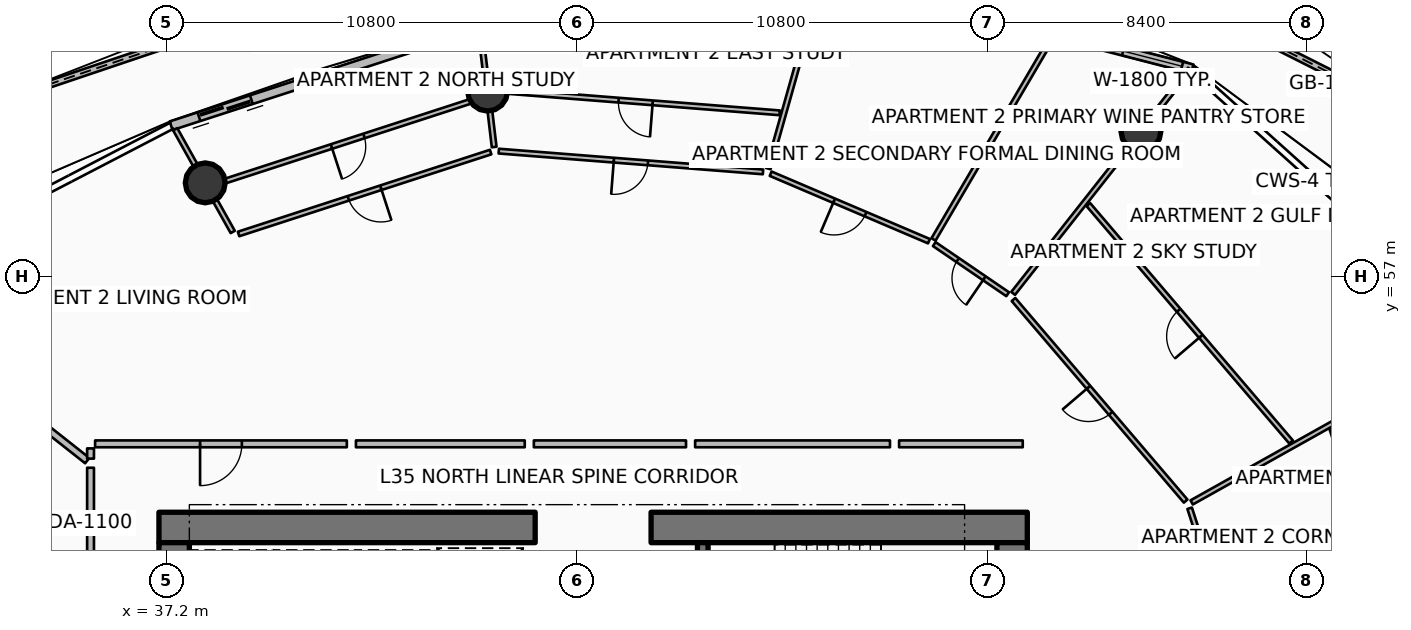
"""IFC4 building model, lengths in metres.
Left out: names, types, materials, properties, quantities, classifications, styles, units other than length and angle.
Written with IfcOpenShell. Run it as: python <this file> out.ifc"""

import sys

from ifc_helpers import new_model, si_unit, direction, frame, frame_2d, origin, origin_2d, place, context, subcontext, project, spatial, polyline, rectangle, circle, outline, extrude, element, fill, save


model = new_model("IFC4")
c1 = context("Model", 3, precision=1e-05, world=origin(), true_north=direction((0.0, 1.0)))
c2 = subcontext(c1, "Body", "Model", "MODEL_VIEW")
j1 = project(units=[si_unit("LENGTHUNIT", "METRE"), si_unit("PLANEANGLEUNIT", "RADIAN")], contexts=[c1])
p1 = place(None, origin())
s1 = spatial("IfcSite", under=j1, at=p1, CompositionType="ELEMENT")
p2 = place(p1, origin())
s2 = spatial("IfcBuilding", under=s1, at=p2, CompositionType="ELEMENT")
p3 = place(p2, frame((0.0, 0.0, 142.8)))
s3 = spatial("IfcBuildingStorey", under=s2, at=p3, CompositionType="ELEMENT", Elevation=142.8)
p4 = place(p3, frame((37.0, 50.4, 0.0), z_axis=(0.0, 0.0, 1.0), x_axis=(1.0, 0.0, 0.0)))
e1 = element("IfcWall", 1, at=p4, inside=s3, PredefinedType="SHEAR", context=c2, shape_type="SweptSolid", body=[
    extrude(rectangle(XDim=9.9, YDim=0.8, at=frame_2d((4.95, 0.0))), origin(), (0.0, 0.0, 1.0), 3.75),
])
p5 = place(p3, frame((49.95, 50.4, 0.0), z_axis=(0.0, 0.0, 1.0), x_axis=(1.0, 0.0, 0.0)))
e2 = element("IfcWall", 2, at=p5, inside=s3, PredefinedType="SHEAR", context=c2, shape_type="SweptSolid", body=[
    extrude(rectangle(XDim=9.9, YDim=0.8, at=frame_2d((4.95, 0.0))), origin(), (0.0, 0.0, 1.0), 3.75),
])
for number, where, z_axis, x_axis in (
    (3, (37.4, 34.0, 0.0), (0.0, 0.0, 1.0), (0.0, 1.0, 0.0)),
    (4, (59.45, 34.0, 0.0), (0.0, 0.0, 1.0), (0.0, 1.0, 0.0)),
):
    element("IfcWall", number, at=place(p3, frame(where, z_axis=z_axis, x_axis=x_axis)), inside=s3, PredefinedType="SHEAR", context=c2, shape_type="SweptSolid", body=[
        extrude(rectangle(XDim=16.0, YDim=0.8, at=frame_2d((8.0, 0.0))), origin(), (0.0, 0.0, 1.0), 3.75),
    ])
p6 = place(p3, frame((51.31, 46.5, 0.0), z_axis=(0.0, 0.0, 1.0), x_axis=(0.0, 1.0, 0.0)))
e5 = element("IfcWall", 5, at=p6, inside=s3, PredefinedType="SHEAR", context=c2, shape_type="SweptSolid", body=[
    extrude(rectangle(XDim=3.5, YDim=0.28, at=frame_2d((1.75, 0.0))), origin(), (0.0, 0.0, 1.0), 3.75),
])
for number, where, z_axis, x_axis in (
    (6, (62.84, 60.824, 0.0), (0.0, 0.0, 1.0), (1.0, 0.0, 0.0)),
    (7, (53.957, 63.122, 0.0), (0.0, 0.0, 1.0), (1.0, 0.0, 0.0)),
    (8, (45.647, 61.881, 0.0), (0.0, 0.0, 1.0), (1.0, 0.0, 0.0)),
    (9, (38.218, 59.467, 0.0), (0.0, 0.0, 1.0), (1.0, 0.0, 0.0)),
):
    element("IfcColumn", number, at=place(p3, frame(where, z_axis=z_axis, x_axis=x_axis)), inside=s3, PredefinedType="COLUMN", context=c2, shape_type="SweptSolid", body=[
        extrude(circle(Radius=0.525, at=origin_2d()), origin(), (0.0, 0.0, 1.0), 3.5),
    ])
p7 = place(p3, frame((70.17, 61.17, 0.0), z_axis=(0.0, 0.0, 1.0), x_axis=(-0.892736735019, 0.450578652344, 0.0)))
e10 = element("IfcWall", 10, at=p7, inside=s3, PredefinedType="PARAPET", context=c2, shape_type="SweptSolid", body=[
    extrude(outline(polyline([(0.0, 0.0), (10.93, 0.0), (10.93, 1.348), (5.465, 1.562), (0.0, 1.747), (0.0, 0.0)])), frame((0.0, 0.09, 0.0), z_axis=(0.0, -1.0, 0.0), x_axis=(1.0, 0.0, 0.0)), (0.0, 0.0, 1.0), 0.18),
])
p8 = place(p3, frame((40.64, 64.263, 0.0), z_axis=(0.0, 0.0, 1.0), x_axis=(-0.947571676397, -0.319543296113, 0.0)))
e11 = element("IfcWall", 11, at=p8, inside=s3, PredefinedType="PARAPET", context=c2, shape_type="SweptSolid", body=[
    extrude(outline(polyline([(0.0, 0.0), (9.383, 0.0), (9.383, 1.747), (4.691, 1.562), (0.0, 1.348), (0.0, 0.0)])), frame((0.0, 0.09, 0.0), z_axis=(0.0, -1.0, 0.0), x_axis=(1.0, 0.0, 0.0)), (0.0, 0.0, 1.0), 0.18),
])
p9 = place(p3, frame((64.192, 62.466, 0.0), z_axis=(0.0, 0.0, 1.0), x_axis=(-0.968379685126, 0.249481032214, 0.0)))
e12 = element("IfcWall", 12, at=p9, inside=s3, PredefinedType="SOLIDWALL", context=c2, shape_type="SweptSolid", body=[
    extrude(rectangle(XDim=10.082, YDim=0.24, at=frame_2d((5.041, 0.0))), origin(), (0.0, 0.0, 1.0), 2.45),
])
p10 = place(p9, frame((7.862, 0.0, 0.0)))
e13 = element("IfcOpeningElement", 13, at=p10, cuts=e12, PredefinedType="OPENING", context=c2, shape_type="SweptSolid", body=[
    extrude(rectangle(XDim=1.45, YDim=2.15, at=frame_2d((0.725, 1.075))), frame((0.0, 0.13, 0.0), z_axis=(0.0, -1.0, 0.0), x_axis=(1.0, 0.0, 0.0)), (0.0, 0.0, 1.0), 0.26),
])
p11 = place(p9, frame((0.28, 0.0, 0.65)))
e14 = element("IfcOpeningElement", 14, at=p11, cuts=e12, PredefinedType="OPENING", context=c2, shape_type="SweptSolid", body=[
    extrude(rectangle(XDim=1.6, YDim=1.5, at=frame_2d((0.8, 0.75))), frame((0.0, 0.13, 0.0), z_axis=(0.0, -1.0, 0.0), x_axis=(1.0, 0.0, 0.0)), (0.0, 0.0, 1.0), 0.26),
])
p12 = place(p3, frame((45.49, 63.624, 0.0), z_axis=(0.0, 0.0, 1.0), x_axis=(-0.951046390632, -0.309048156224, 0.0)))
e15 = element("IfcWall", 15, at=p12, inside=s3, PredefinedType="SOLIDWALL", context=c2, shape_type="SweptSolid", body=[
    extrude(rectangle(XDim=8.59, YDim=0.24, at=frame_2d((4.295, 0.0))), origin(), (0.0, 0.0, 1.0), 2.45),
])
p13 = place(p12, frame((6.37, 0.0, 0.0)))
e16 = element("IfcOpeningElement", 16, at=p13, cuts=e15, PredefinedType="OPENING", context=c2, shape_type="SweptSolid", body=[
    extrude(rectangle(XDim=1.45, YDim=2.15, at=frame_2d((0.725, 1.075))), frame((0.0, 0.13, 0.0), z_axis=(0.0, -1.0, 0.0), x_axis=(1.0, 0.0, 0.0)), (0.0, 0.0, 1.0), 0.26),
])
p14 = place(p12, frame((0.28, 0.0, 0.65)))
e17 = element("IfcOpeningElement", 17, at=p14, cuts=e15, PredefinedType="OPENING", context=c2, shape_type="SweptSolid", body=[
    extrude(rectangle(XDim=1.6, YDim=1.5, at=frame_2d((0.8, 0.75))), frame((0.0, 0.13, 0.0), z_axis=(0.0, -1.0, 0.0), x_axis=(1.0, 0.0, 0.0)), (0.0, 0.0, 1.0), 0.26),
])
p15 = place(p3, frame((35.114, 52.159, 0.0), z_axis=(0.0, 0.0, 1.0), x_axis=(-0.78531739611, 0.619093359169, 0.0)))
e18 = element("IfcWall", 18, at=p15, inside=s3, PredefinedType="PARTITIONING", context=c2, shape_type="SweptSolid", body=[
    extrude(rectangle(XDim=7.43, YDim=0.18, at=frame_2d((3.715, 0.0))), origin(), (0.0, 0.0, 1.0), 2.94),
])
p16 = place(p3, frame((35.2, 51.971, 0.0), z_axis=(0.0, 0.0, 1.0), x_axis=(0.0, -1.0, 0.0)))
e19 = element("IfcWall", 19, at=p16, inside=s3, PredefinedType="PARTITIONING", context=c2, shape_type="SweptSolid", body=[
    extrude(rectangle(XDim=6.241, YDim=0.18, at=frame_2d((3.12, 0.0))), origin(), (0.0, 0.0, 1.0), 2.94),
])
p17 = place(p16, frame((2.57, 0.0, 0.0)))
e20 = element("IfcOpeningElement", 20, at=p17, cuts=e19, PredefinedType="OPENING", context=c2, shape_type="SweptSolid", body=[
    extrude(rectangle(XDim=1.1, YDim=2.1, at=frame_2d((0.55, 1.05))), frame((0.0, 0.1, 0.0), z_axis=(0.0, -1.0, 0.0), x_axis=(1.0, 0.0, 0.0)), (0.0, 0.0, 1.0), 0.2),
])
p18 = place(p3, frame((41.944, 52.6, 0.0), z_axis=(0.0, 0.0, 1.0), x_axis=(-1.0, 0.0, 0.0)))
e21 = element("IfcWall", 21, at=p18, inside=s3, PredefinedType="PARTITIONING", context=c2, shape_type="SweptSolid", body=[
    extrude(rectangle(XDim=6.624, YDim=0.18, at=frame_2d((3.312, 0.0))), origin(), (0.0, 0.0, 1.0), 2.94),
])
p19 = place(p18, frame((2.762, 0.0, 0.0)))
e22 = element("IfcOpeningElement", 22, at=p19, cuts=e21, PredefinedType="OPENING", context=c2, shape_type="SweptSolid", body=[
    extrude(rectangle(XDim=1.1, YDim=2.1, at=frame_2d((0.55, 1.05))), frame((0.0, 0.1, 0.0), z_axis=(0.0, -1.0, 0.0), x_axis=(1.0, 0.0, 0.0)), (0.0, 0.0, 1.0), 0.2),
])
p20 = place(p3, frame((35.2, 52.48, 0.0), z_axis=(0.0, 0.0, 1.0), x_axis=(0.0, -1.0, 0.0)))
e23 = element("IfcWall", 23, at=p20, inside=s3, PredefinedType="PARTITIONING", context=c2, shape_type="SweptSolid", body=[
    extrude(rectangle(XDim=0.269, YDim=0.18, at=frame_2d((0.135, 0.0))), origin(), (0.0, 0.0, 1.0), 2.94),
])
p21 = place(p3, frame((66.277, 44.272, 0.0), z_axis=(0.0, 0.0, 1.0), x_axis=(-0.308993461661, 0.951064162215, 0.0)))
e24 = element("IfcWall", 24, at=p21, inside=s3, PredefinedType="PARTITIONING", context=c2, shape_type="SweptSolid", body=[
    extrude(rectangle(XDim=6.974, YDim=0.125, at=frame_2d((3.487, 0.0))), origin(), (0.0, 0.0, 1.0), 2.94),
])
p22 = place(p21, frame((3.037, 0.0, 0.0)))
e25 = element("IfcOpeningElement", 25, at=p22, cuts=e24, PredefinedType="OPENING", context=c2, shape_type="SweptSolid", body=[
    extrude(rectangle(XDim=0.9, YDim=2.08, at=frame_2d((0.45, 1.04))), frame((0.0, 0.073, 0.0), z_axis=(0.0, -1.0, 0.0), x_axis=(1.0, 0.0, 0.0)), (0.0, 0.0, 1.0), 0.145),
])
p23 = place(p3, frame((70.535, 44.776, 0.0), z_axis=(0.0, 0.0, 1.0), x_axis=(-0.309002443549, 0.951061244022, 0.0)))
e26 = element("IfcWall", 26, at=p23, inside=s3, PredefinedType="PARTITIONING", context=c2, shape_type="SweptSolid", body=[
    extrude(rectangle(XDim=8.647, YDim=0.125, at=frame_2d((4.324, 0.0))), origin(), (0.0, 0.0, 1.0), 2.94),
])
p24 = place(p23, frame((3.874, 0.0, 0.0)))
e27 = element("IfcOpeningElement", 27, at=p24, cuts=e26, PredefinedType="OPENING", context=c2, shape_type="SweptSolid", body=[
    extrude(rectangle(XDim=0.9, YDim=2.08, at=frame_2d((0.45, 1.04))), frame((0.0, 0.073, 0.0), z_axis=(0.0, -1.0, 0.0), x_axis=(1.0, 0.0, 0.0)), (0.0, 0.0, 1.0), 0.145),
])
p25 = place(p3, frame((59.73, 52.6, 0.0), z_axis=(0.0, 0.0, 1.0), x_axis=(-1.0, 0.0, 0.0)))
e28 = element("IfcWall", 28, at=p25, inside=s3, PredefinedType="PARTITIONING", context=c2, shape_type="SweptSolid", body=[
    extrude(rectangle(XDim=3.254, YDim=0.18, at=frame_2d((1.627, 0.0))), origin(), (0.0, 0.0, 1.0), 2.94),
])
p26 = place(p3, frame((64.175, 51.059, 0.0), z_axis=(0.0, 0.0, 1.0), x_axis=(0.872491881101, 0.488628608877, 0.0)))
e29 = element("IfcWall", 29, at=p26, inside=s3, PredefinedType="PARTITIONING", context=c2, shape_type="SweptSolid", body=[
    extrude(rectangle(XDim=8.247, YDim=0.125, at=frame_2d((4.124, 0.0))), origin(), (0.0, 0.0, 1.0), 2.94),
])
p27 = place(p3, frame((64.017, 51.093, 0.0), z_axis=(0.0, 0.0, 1.0), x_axis=(-0.649447060425, 0.76040680935, 0.0)))
e30 = element("IfcWall", 30, at=p27, inside=s3, PredefinedType="PARTITIONING", context=c2, shape_type="SweptSolid", body=[
    extrude(rectangle(XDim=6.975, YDim=0.125, at=frame_2d((3.487, 0.0))), origin(), (0.0, 0.0, 1.0), 2.94),
])
p28 = place(p27, frame((3.037, 0.0, 0.0)))
e31 = element("IfcOpeningElement", 31, at=p28, cuts=e30, PredefinedType="OPENING", context=c2, shape_type="SweptSolid", body=[
    extrude(rectangle(XDim=0.9, YDim=2.08, at=frame_2d((0.45, 1.04))), frame((0.0, 0.073, 0.0), z_axis=(0.0, -1.0, 0.0), x_axis=(1.0, 0.0, 0.0)), (0.0, 0.0, 1.0), 0.145),
])
p29 = place(p3, frame((66.792, 52.648, 0.0), z_axis=(0.0, 0.0, 1.0), x_axis=(-0.649446834215, 0.76040700255, 0.0)))
e32 = element("IfcWall", 32, at=p29, inside=s3, PredefinedType="PARTITIONING", context=c2, shape_type="SweptSolid", body=[
    extrude(rectangle(XDim=8.216, YDim=0.125, at=frame_2d((4.108, 0.0))), origin(), (0.0, 0.0, 1.0), 2.94),
])
p30 = place(p29, frame((3.658, 0.0, 0.0)))
e33 = element("IfcOpeningElement", 33, at=p30, cuts=e32, PredefinedType="OPENING", context=c2, shape_type="SweptSolid", body=[
    extrude(rectangle(XDim=0.9, YDim=2.08, at=frame_2d((0.45, 1.04))), frame((0.0, 0.073, 0.0), z_axis=(0.0, -1.0, 0.0), x_axis=(1.0, 0.0, 0.0)), (0.0, 0.0, 1.0), 0.145),
])
p31 = place(p3, frame((56.236, 52.6, 0.0), z_axis=(0.0, 0.0, 1.0), x_axis=(-1.0, 0.0, 0.0)))
e34 = element("IfcWall", 34, at=p31, inside=s3, PredefinedType="PARTITIONING", context=c2, shape_type="SweptSolid", body=[
    extrude(rectangle(XDim=5.127, YDim=0.18, at=frame_2d((2.563, 0.0))), origin(), (0.0, 0.0, 1.0), 2.94),
])
p32 = place(p3, frame((59.477, 56.559, 0.0), z_axis=(0.0, 0.0, 1.0), x_axis=(0.619110986016, 0.785303499925, 0.0)))
e35 = element("IfcWall", 35, at=p32, inside=s3, PredefinedType="PARTITIONING", context=c2, shape_type="SweptSolid", body=[
    extrude(rectangle(XDim=7.513, YDim=0.125, at=frame_2d((3.756, 0.0))), origin(), (0.0, 0.0, 1.0), 2.94),
])
p33 = place(p3, frame((57.382, 57.978, 0.0), z_axis=(0.0, 0.0, 1.0), x_axis=(0.506339561396, 0.862334186128, 0.0)))
e36 = element("IfcWall", 36, at=p33, inside=s3, PredefinedType="PARTITIONING", context=c2, shape_type="SweptSolid", body=[
    extrude(rectangle(XDim=6.163, YDim=0.125, at=frame_2d((3.081, 0.0))), origin(), (0.0, 0.0, 1.0), 2.94),
])
p34 = place(p3, frame((59.333, 56.537, 0.0), z_axis=(0.0, 0.0, 1.0), x_axis=(-0.825780816813, 0.563991172434, 0.0)))
e37 = element("IfcWall", 37, at=p34, inside=s3, PredefinedType="PARTITIONING", context=c2, shape_type="SweptSolid", body=[
    extrude(rectangle(XDim=2.338, YDim=0.125, at=frame_2d((1.169, 0.0))), origin(), (0.0, 0.0, 1.0), 2.94),
])
p35 = place(p34, frame((0.744, 0.0, 0.0)))
e38 = element("IfcOpeningElement", 38, at=p35, cuts=e37, PredefinedType="OPENING", context=c2, shape_type="SweptSolid", body=[
    extrude(rectangle(XDim=0.85, YDim=2.06, at=frame_2d((0.425, 1.03))), frame((0.0, 0.073, 0.0), z_axis=(0.0, -1.0, 0.0), x_axis=(1.0, 0.0, 0.0)), (0.0, 0.0, 1.0), 0.145),
])
p36 = place(p3, frame((57.263, 57.932, 0.0), z_axis=(0.0, 0.0, 1.0), x_axis=(-0.919910192906, 0.392129107549, 0.0)))
e39 = element("IfcWall", 39, at=p36, inside=s3, PredefinedType="PARTITIONING", context=c2, shape_type="SweptSolid", body=[
    extrude(rectangle(XDim=4.528, YDim=0.125, at=frame_2d((2.264, 0.0))), origin(), (0.0, 0.0, 1.0), 2.94),
])
p37 = place(p36, frame((1.814, 0.0, 0.0)))
e40 = element("IfcOpeningElement", 40, at=p37, cuts=e39, PredefinedType="OPENING", context=c2, shape_type="SweptSolid", body=[
    extrude(rectangle(XDim=0.9, YDim=2.08, at=frame_2d((0.45, 1.04))), frame((0.0, 0.073, 0.0), z_axis=(0.0, -1.0, 0.0), x_axis=(1.0, 0.0, 0.0)), (0.0, 0.0, 1.0), 0.145),
])
p38 = place(p3, frame((50.869, 52.6, 0.0), z_axis=(0.0, 0.0, 1.0), x_axis=(-1.0, 0.0, 0.0)))
e41 = element("IfcWall", 41, at=p38, inside=s3, PredefinedType="PARTITIONING", context=c2, shape_type="SweptSolid", body=[
    extrude(rectangle(XDim=4.004, YDim=0.18, at=frame_2d((2.002, 0.0))), origin(), (0.0, 0.0, 1.0), 2.94),
])
p39 = place(p3, frame((53.032, 59.843, 0.0), z_axis=(0.0, 0.0, 1.0), x_axis=(0.271445669276, 0.962453764412, 0.0)))
e42 = element("IfcWall", 42, at=p39, inside=s3, PredefinedType="PARTITIONING", context=c2, shape_type="SweptSolid", body=[
    extrude(rectangle(XDim=5.2, YDim=0.125, at=frame_2d((2.6, 0.0))), origin(), (0.0, 0.0, 1.0), 2.94),
])
p40 = place(p3, frame((52.896, 59.755, 0.0), z_axis=(0.0, 0.0, 1.0), x_axis=(-0.996918496177, 0.078444324085, 0.0)))
e43 = element("IfcWall", 43, at=p40, inside=s3, PredefinedType="PARTITIONING", context=c2, shape_type="SweptSolid", body=[
    extrude(rectangle(XDim=6.975, YDim=0.125, at=frame_2d((3.487, 0.0))), origin(), (0.0, 0.0, 1.0), 2.94),
])
p41 = place(p40, frame((3.037, 0.0, 0.0)))
e44 = element("IfcOpeningElement", 44, at=p41, cuts=e43, PredefinedType="OPENING", context=c2, shape_type="SweptSolid", body=[
    extrude(rectangle(XDim=0.9, YDim=2.08, at=frame_2d((0.45, 1.04))), frame((0.0, 0.073, 0.0), z_axis=(0.0, -1.0, 0.0), x_axis=(1.0, 0.0, 0.0)), (0.0, 0.0, 1.0), 0.145),
])
p42 = place(p3, frame((53.334, 61.31, 0.0), z_axis=(0.0, 0.0, 1.0), x_axis=(-0.996916945499, 0.078464028559, 0.0)))
e45 = element("IfcWall", 45, at=p42, inside=s3, PredefinedType="PARTITIONING", context=c2, shape_type="SweptSolid", body=[
    extrude(rectangle(XDim=7.604, YDim=0.125, at=frame_2d((3.802, 0.0))), origin(), (0.0, 0.0, 1.0), 2.94),
])
p43 = place(p42, frame((3.352, 0.0, 0.0)))
e46 = element("IfcOpeningElement", 46, at=p43, cuts=e45, PredefinedType="OPENING", context=c2, shape_type="SweptSolid", body=[
    extrude(rectangle(XDim=0.9, YDim=2.08, at=frame_2d((0.45, 1.04))), frame((0.0, 0.073, 0.0), z_axis=(0.0, -1.0, 0.0), x_axis=(1.0, 0.0, 0.0)), (0.0, 0.0, 1.0), 0.145),
])
p44 = place(p3, frame((46.625, 52.6, 0.0), z_axis=(0.0, 0.0, 1.0), x_axis=(-1.0, 0.0, 0.0)))
e47 = element("IfcWall", 47, at=p44, inside=s3, PredefinedType="PARTITIONING", context=c2, shape_type="SweptSolid", body=[
    extrude(rectangle(XDim=4.442, YDim=0.18, at=frame_2d((2.221, 0.0))), origin(), (0.0, 0.0, 1.0), 2.94),
])
p45 = place(p3, frame((45.821, 60.41, 0.0), z_axis=(0.0, 0.0, 1.0), x_axis=(-0.117497237937, 0.993073209324, 0.0)))
e48 = element("IfcWall", 48, at=p45, inside=s3, PredefinedType="PARTITIONING", context=c2, shape_type="SweptSolid", body=[
    extrude(rectangle(XDim=3.196, YDim=0.125, at=frame_2d((1.598, 0.0))), origin(), (0.0, 0.0, 1.0), 2.94),
])
p46 = place(p3, frame((38.941, 58.175, 0.0), z_axis=(0.0, 0.0, 1.0), x_axis=(-0.488620181058, 0.872496600946, 0.0)))
e49 = element("IfcWall", 49, at=p46, inside=s3, PredefinedType="PARTITIONING", context=c2, shape_type="SweptSolid", body=[
    extrude(rectangle(XDim=3.095, YDim=0.125, at=frame_2d((1.548, 0.0))), origin(), (0.0, 0.0, 1.0), 2.94),
])
p47 = place(p3, frame((45.728, 60.277, 0.0), z_axis=(0.0, 0.0, 1.0), x_axis=(-0.951064162215, -0.308993461661, 0.0)))
e50 = element("IfcWall", 50, at=p47, inside=s3, PredefinedType="PARTITIONING", context=c2, shape_type="SweptSolid", body=[
    extrude(rectangle(XDim=6.974, YDim=0.125, at=frame_2d((3.487, 0.0))), origin(), (0.0, 0.0, 1.0), 2.94),
])
p48 = place(p47, frame((3.037, 0.0, 0.0)))
e51 = element("IfcOpeningElement", 51, at=p48, cuts=e50, PredefinedType="OPENING", context=c2, shape_type="SweptSolid", body=[
    extrude(rectangle(XDim=0.9, YDim=2.08, at=frame_2d((0.45, 1.04))), frame((0.0, 0.073, 0.0), z_axis=(0.0, -1.0, 0.0), x_axis=(1.0, 0.0, 0.0)), (0.0, 0.0, 1.0), 0.145),
])
p49 = place(p3, frame((45.556, 61.728, 0.0), z_axis=(0.0, 0.0, 1.0), x_axis=(-0.951060224054, -0.309005582834, 0.0)))
e52 = element("IfcWall", 52, at=p49, inside=s3, PredefinedType="PARTITIONING", context=c2, shape_type="SweptSolid", body=[
    extrude(rectangle(XDim=7.544, YDim=0.125, at=frame_2d((3.772, 0.0))), origin(), (0.0, 0.0, 1.0), 2.94),
])
p50 = place(p49, frame((3.322, 0.0, 0.0)))
e53 = element("IfcOpeningElement", 53, at=p50, cuts=e52, PredefinedType="OPENING", context=c2, shape_type="SweptSolid", body=[
    extrude(rectangle(XDim=0.9, YDim=2.08, at=frame_2d((0.45, 1.04))), frame((0.0, 0.073, 0.0), z_axis=(0.0, -1.0, 0.0), x_axis=(1.0, 0.0, 0.0)), (0.0, 0.0, 1.0), 0.145),
])
p51 = place(p11, origin())
e54 = element("IfcWindow", 54, at=p51, inside=s3, PartitioningType="SINGLE_PANEL", PredefinedType="WINDOW", context=c2, shape_type="SweptSolid", body=[
    extrude(rectangle(XDim=1.6, YDim=1.5, at=frame_2d((0.8, 0.75))), frame((0.0, 0.03, 0.0), z_axis=(0.0, -1.0, 0.0), x_axis=(1.0, 0.0, 0.0)), (0.0, 0.0, 1.0), 0.06),
])
fill(e14, e54)
p52 = place(p13, origin())
e55 = element("IfcDoor", 55, at=p52, inside=s3, OperationType="DOUBLE_DOOR_SLIDING", PredefinedType="DOOR", context=c2, shape_type="SweptSolid", body=[
    extrude(rectangle(XDim=1.45, YDim=2.15, at=frame_2d((0.725, 1.075))), frame((0.0, 0.025, 0.0), z_axis=(0.0, -1.0, 0.0), x_axis=(1.0, 0.0, 0.0)), (0.0, 0.0, 1.0), 0.05),
])
fill(e16, e55)
p53 = place(p19, origin())
e56 = element("IfcDoor", 56, at=p53, inside=s3, OperationType="SINGLE_SWING_RIGHT", PredefinedType="DOOR", context=c2, shape_type="SweptSolid", body=[
    extrude(rectangle(XDim=1.1, YDim=2.1, at=frame_2d((0.55, 1.05))), frame((0.0, 0.025, 0.0), z_axis=(0.0, -1.0, 0.0), x_axis=(1.0, 0.0, 0.0)), (0.0, 0.0, 1.0), 0.05),
])
fill(e22, e56)
p54 = place(p28, origin())
e57 = element("IfcDoor", 57, at=p54, inside=s3, OperationType="SINGLE_SWING_RIGHT", PredefinedType="DOOR", context=c2, shape_type="SweptSolid", body=[
    extrude(rectangle(XDim=0.9, YDim=2.08, at=frame_2d((0.45, 1.04))), frame((0.0, 0.025, 0.0), z_axis=(0.0, -1.0, 0.0), x_axis=(1.0, 0.0, 0.0)), (0.0, 0.0, 1.0), 0.05),
])
fill(e31, e57)
p55 = place(p30, origin())
e58 = element("IfcDoor", 58, at=p55, inside=s3, OperationType="SINGLE_SWING_LEFT", PredefinedType="DOOR", context=c2, shape_type="SweptSolid", body=[
    extrude(rectangle(XDim=0.9, YDim=2.08, at=frame_2d((0.45, 1.04))), frame((0.0, 0.025, 0.0), z_axis=(0.0, -1.0, 0.0), x_axis=(1.0, 0.0, 0.0)), (0.0, 0.0, 1.0), 0.05),
])
fill(e33, e58)
p56 = place(p35, origin())
e59 = element("IfcDoor", 59, at=p56, inside=s3, OperationType="SINGLE_SWING_LEFT", PredefinedType="DOOR", context=c2, shape_type="SweptSolid", body=[
    extrude(rectangle(XDim=0.85, YDim=2.06, at=frame_2d((0.425, 1.03))), frame((0.0, 0.025, 0.0), z_axis=(0.0, -1.0, 0.0), x_axis=(1.0, 0.0, 0.0)), (0.0, 0.0, 1.0), 0.05),
])
fill(e38, e59)
p57 = place(p37, origin())
e60 = element("IfcDoor", 60, at=p57, inside=s3, OperationType="SINGLE_SWING_RIGHT", PredefinedType="DOOR", context=c2, shape_type="SweptSolid", body=[
    extrude(rectangle(XDim=0.9, YDim=2.08, at=frame_2d((0.45, 1.04))), frame((0.0, 0.025, 0.0), z_axis=(0.0, -1.0, 0.0), x_axis=(1.0, 0.0, 0.0)), (0.0, 0.0, 1.0), 0.05),
])
fill(e40, e60)
p58 = place(p41, origin())
e61 = element("IfcDoor", 61, at=p58, inside=s3, OperationType="SINGLE_SWING_RIGHT", PredefinedType="DOOR", context=c2, shape_type="SweptSolid", body=[
    extrude(rectangle(XDim=0.9, YDim=2.08, at=frame_2d((0.45, 1.04))), frame((0.0, 0.025, 0.0), z_axis=(0.0, -1.0, 0.0), x_axis=(1.0, 0.0, 0.0)), (0.0, 0.0, 1.0), 0.05),
])
fill(e44, e61)
p59 = place(p43, origin())
e62 = element("IfcDoor", 62, at=p59, inside=s3, OperationType="SINGLE_SWING_LEFT", PredefinedType="DOOR", context=c2, shape_type="SweptSolid", body=[
    extrude(rectangle(XDim=0.9, YDim=2.08, at=frame_2d((0.45, 1.04))), frame((0.0, 0.025, 0.0), z_axis=(0.0, -1.0, 0.0), x_axis=(1.0, 0.0, 0.0)), (0.0, 0.0, 1.0), 0.05),
])
fill(e46, e62)
p60 = place(p48, origin())
e63 = element("IfcDoor", 63, at=p60, inside=s3, OperationType="SINGLE_SWING_LEFT", PredefinedType="DOOR", context=c2, shape_type="SweptSolid", body=[
    extrude(rectangle(XDim=0.9, YDim=2.08, at=frame_2d((0.45, 1.04))), frame((0.0, 0.025, 0.0), z_axis=(0.0, -1.0, 0.0), x_axis=(1.0, 0.0, 0.0)), (0.0, 0.0, 1.0), 0.05),
])
fill(e51, e63)
p61 = place(p50, origin())
e64 = element("IfcDoor", 64, at=p61, inside=s3, OperationType="SINGLE_SWING_RIGHT", PredefinedType="DOOR", context=c2, shape_type="SweptSolid", body=[
    extrude(rectangle(XDim=0.9, YDim=2.08, at=frame_2d((0.45, 1.04))), frame((0.0, 0.025, 0.0), z_axis=(0.0, -1.0, 0.0), x_axis=(1.0, 0.0, 0.0)), (0.0, 0.0, 1.0), 0.05),
])
fill(e53, e64)
save(model, sys.argv[1])
